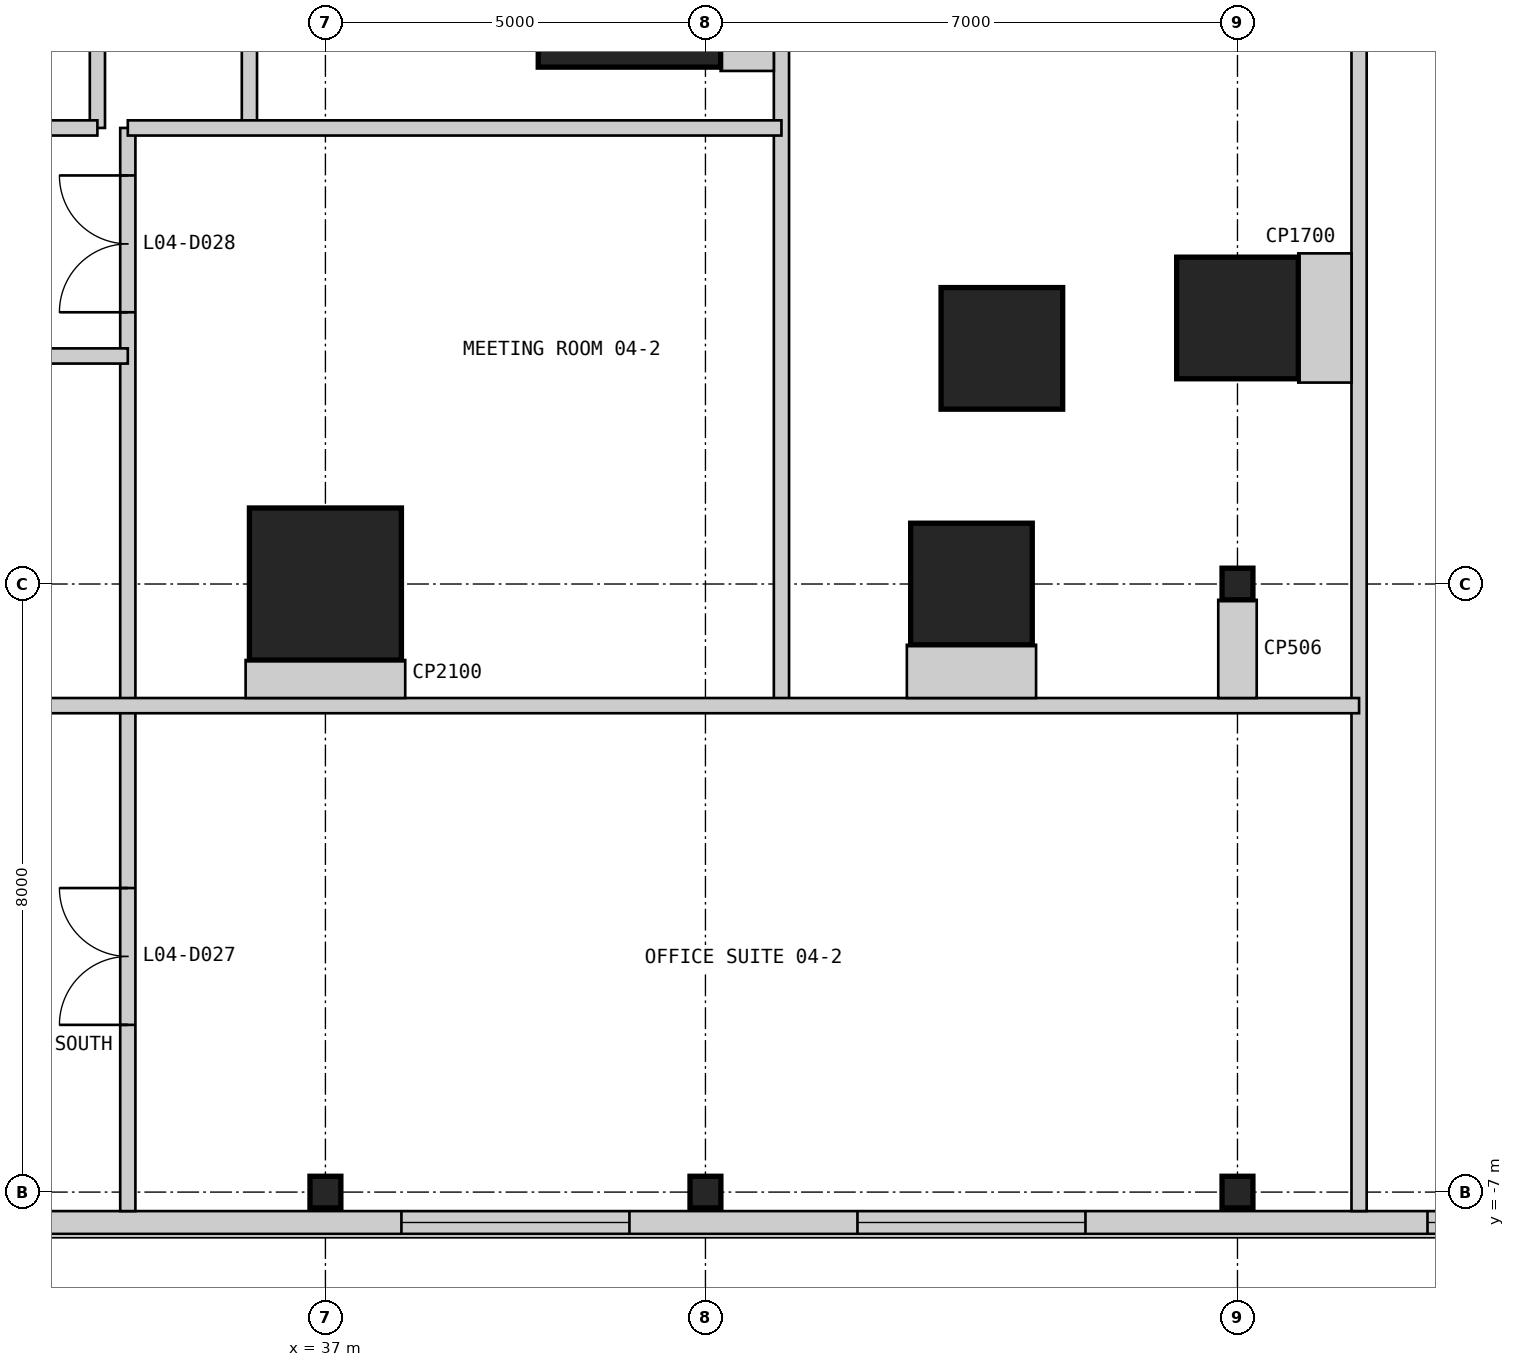
"""IFC4 building model, lengths in metres.
Left out: names, types, materials, properties, quantities, classifications, styles, units other than length and angle.
Written with IfcOpenShell. Run it as: python <this file> out.ifc"""

import sys

from ifc_helpers import new_model, si_unit, direction, frame, frame_2d, origin, origin_2d, place, context, subcontext, project, spatial, rectangle, i_section, extrude, element, fill, save


model = new_model("IFC4")
c1 = context("Model", 3, precision=1e-05, world=origin(), true_north=direction((0.0, 1.0)))
c2 = subcontext(c1, "Body", "Model", "MODEL_VIEW")
j1 = project(units=[si_unit("LENGTHUNIT", "METRE"), si_unit("PLANEANGLEUNIT", "RADIAN")], contexts=[c1])
p1 = place(None, origin())
s1 = spatial("IfcSite", under=j1, at=p1, CompositionType="ELEMENT")
p2 = place(p1, origin())
s2 = spatial("IfcBuilding", under=s1, at=p2, CompositionType="ELEMENT")
p3 = place(p2, frame((0.0, 0.0, 21.4)))
s3 = spatial("IfcBuildingStorey", under=s2, at=p3, CompositionType="ELEMENT", Elevation=21.4)
p4 = place(p3, frame((41.0, 9.0, 0.0), z_axis=(0.0, 0.0, 1.0), x_axis=(1.0, 0.0, 0.0)))
e1 = element("IfcColumn", 1, at=p4, inside=s3, PredefinedType="COLUMN", context=c2, shape_type="SweptSolid", body=[
    extrude(rectangle(XDim=2.4, YDim=2.4, at=origin_2d()), origin(), (0.0, 0.0, 1.0), 4.8),
])
p5 = place(p3, frame((37.0, 1.0, 0.0), z_axis=(0.0, 0.0, 1.0), x_axis=(1.0, 0.0, 0.0)))
e2 = element("IfcColumn", 2, at=p5, inside=s3, PredefinedType="COLUMN", context=c2, shape_type="SweptSolid", body=[
    extrude(rectangle(XDim=2.0, YDim=2.0, at=origin_2d()), origin(), (0.0, 0.0, 1.0), 4.8),
])
for number, where, z_axis, x_axis in (
    (3, (45.5, 1.0, 0.0), (0.0, 0.0, 1.0), (1.0, 0.0, 0.0)),
    (4, (45.9, 4.1, 0.0), (0.0, 0.0, 1.0), (1.0, 0.0, 0.0)),
    (5, (49.0, 4.5, 0.0), (0.0, 0.0, 1.0), (1.0, 0.0, 0.0)),
):
    element("IfcColumn", number, at=place(p3, frame(where, z_axis=z_axis, x_axis=x_axis)), inside=s3, PredefinedType="COLUMN", context=c2, shape_type="SweptSolid", body=[
        extrude(rectangle(XDim=1.6, YDim=1.6, at=origin_2d()), origin(), (0.0, 0.0, 1.0), 4.8),
    ])
for number, where, z_axis, x_axis in (
    (6, (37.0, -7.0, 0.0), (0.0, 0.0, 1.0), (1.0, 0.0, 0.0)),
    (7, (42.0, -7.0, 0.0), (0.0, 0.0, 1.0), (1.0, 0.0, 0.0)),
    (8, (49.0, -7.0, 0.0), (0.0, 0.0, 1.0), (1.0, 0.0, 0.0)),
    (9, (49.0, 1.0, 0.0), (0.0, 0.0, 1.0), (1.0, 0.0, 0.0)),
):
    element("IfcColumn", number, at=place(p3, frame(where, z_axis=z_axis, x_axis=x_axis)), inside=s3, PredefinedType="COLUMN", context=c2, shape_type="SweptSolid", body=[
        extrude(i_section(OverallWidth=0.406, OverallDepth=0.417, WebThickness=0.03, FlangeThickness=0.048, at=origin_2d()), origin(), (0.0, 0.0, 1.0), 4.8),
    ])
p6 = place(p3, frame((-7.55, -7.4, 0.0), z_axis=(0.0, 0.0, 1.0), x_axis=(1.0, 0.0, 0.0)))
e10 = element("IfcWall", 10, at=p6, inside=s3, PredefinedType="SOLIDWALL", context=c2, shape_type="SweptSolid", body=[
    extrude(rectangle(XDim=65.1, YDim=0.3, at=frame_2d((32.55, 0.0))), origin(), (0.0, 0.0, 1.0), 4.5),
])
p7 = place(p6, frame((3.05, 0.0, 0.9)))
e11 = element("IfcOpeningElement", 11, at=p7, cuts=e10, PredefinedType="OPENING", context=c2, shape_type="SweptSolid", body=[
    extrude(rectangle(XDim=3.0, YDim=2.4, at=frame_2d((1.5, 1.2))), frame((0.0, 0.16, 0.0), z_axis=(0.0, -1.0, 0.0), x_axis=(1.0, 0.0, 0.0)), (0.0, 0.0, 1.0), 0.32),
])
p8 = place(p6, frame((11.05, 0.0, 0.9)))
e12 = element("IfcOpeningElement", 12, at=p8, cuts=e10, PredefinedType="OPENING", context=c2, shape_type="SweptSolid", body=[
    extrude(rectangle(XDim=3.0, YDim=2.4, at=frame_2d((1.5, 1.2))), frame((0.0, 0.16, 0.0), z_axis=(0.0, -1.0, 0.0), x_axis=(1.0, 0.0, 0.0)), (0.0, 0.0, 1.0), 0.32),
])
p9 = place(p6, frame((25.05, 0.0, 0.9)))
e13 = element("IfcOpeningElement", 13, at=p9, cuts=e10, PredefinedType="OPENING", context=c2, shape_type="SweptSolid", body=[
    extrude(rectangle(XDim=3.0, YDim=2.4, at=frame_2d((1.5, 1.2))), frame((0.0, 0.16, 0.0), z_axis=(0.0, -1.0, 0.0), x_axis=(1.0, 0.0, 0.0)), (0.0, 0.0, 1.0), 0.32),
])
p10 = place(p6, frame((37.05, 0.0, 0.9)))
e14 = element("IfcOpeningElement", 14, at=p10, cuts=e10, PredefinedType="OPENING", context=c2, shape_type="SweptSolid", body=[
    extrude(rectangle(XDim=3.0, YDim=2.4, at=frame_2d((1.5, 1.2))), frame((0.0, 0.16, 0.0), z_axis=(0.0, -1.0, 0.0), x_axis=(1.0, 0.0, 0.0)), (0.0, 0.0, 1.0), 0.32),
])
p11 = place(p6, frame((45.55, 0.0, 0.9)))
e15 = element("IfcOpeningElement", 15, at=p11, cuts=e10, PredefinedType="OPENING", context=c2, shape_type="SweptSolid", body=[
    extrude(rectangle(XDim=3.0, YDim=2.4, at=frame_2d((1.5, 1.2))), frame((0.0, 0.16, 0.0), z_axis=(0.0, -1.0, 0.0), x_axis=(1.0, 0.0, 0.0)), (0.0, 0.0, 1.0), 0.32),
])
p12 = place(p6, frame((51.55, 0.0, 0.9)))
e16 = element("IfcOpeningElement", 16, at=p12, cuts=e10, PredefinedType="OPENING", context=c2, shape_type="SweptSolid", body=[
    extrude(rectangle(XDim=3.0, YDim=2.4, at=frame_2d((1.5, 1.2))), frame((0.0, 0.16, 0.0), z_axis=(0.0, -1.0, 0.0), x_axis=(1.0, 0.0, 0.0)), (0.0, 0.0, 1.0), 0.32),
])
p13 = place(p6, frame((59.05, 0.0, 0.9)))
e17 = element("IfcOpeningElement", 17, at=p13, cuts=e10, PredefinedType="OPENING", context=c2, shape_type="SweptSolid", body=[
    extrude(rectangle(XDim=3.0, YDim=2.4, at=frame_2d((1.5, 1.2))), frame((0.0, 0.16, 0.0), z_axis=(0.0, -1.0, 0.0), x_axis=(1.0, 0.0, 0.0)), (0.0, 0.0, 1.0), 0.32),
])
p14 = place(p3, frame((34.0, 7.0, 0.0), z_axis=(0.0, 0.0, 1.0), x_axis=(0.0, 1.0, 0.0)))
e18 = element("IfcWall", 18, at=p14, inside=s3, PredefinedType="PARTITIONING", context=c2, shape_type="SweptSolid", body=[
    extrude(rectangle(XDim=3.6, YDim=0.2, at=frame_2d((1.8, 0.0))), origin(), (0.0, 0.0, 1.0), 3.843),
])
p15 = place(p3, frame((34.4, -7.25, 0.0), z_axis=(0.0, 0.0, 1.0), x_axis=(0.0, 1.0, 0.0)))
e19 = element("IfcWall", 19, at=p15, inside=s3, PredefinedType="PARTITIONING", context=c2, shape_type="SweptSolid", body=[
    extrude(rectangle(XDim=14.25, YDim=0.2, at=frame_2d((7.125, 0.0))), origin(), (0.0, 0.0, 1.0), 4.5),
])
p16 = place(p15, frame((2.45, 0.0, 0.0)))
e20 = element("IfcOpeningElement", 20, at=p16, cuts=e19, PredefinedType="OPENING", context=c2, shape_type="SweptSolid", body=[
    extrude(rectangle(XDim=1.8, YDim=2.4, at=frame_2d((0.9, 1.2))), frame((0.0, 0.11, 0.0), z_axis=(0.0, -1.0, 0.0), x_axis=(1.0, 0.0, 0.0)), (0.0, 0.0, 1.0), 0.22),
])
p17 = place(p15, frame((11.825, 0.0, 0.0)))
e21 = element("IfcOpeningElement", 21, at=p17, cuts=e19, PredefinedType="OPENING", context=c2, shape_type="SweptSolid", body=[
    extrude(rectangle(XDim=1.8, YDim=2.4, at=frame_2d((0.9, 1.2))), frame((0.0, 0.11, 0.0), z_axis=(0.0, -1.0, 0.0), x_axis=(1.0, 0.0, 0.0)), (0.0, 0.0, 1.0), 0.22),
])
p18 = place(p3, frame((36.0, 7.0, 0.0), z_axis=(0.0, 0.0, 1.0), x_axis=(0.0, 1.0, 0.0)))
e22 = element("IfcWall", 22, at=p18, inside=s3, PredefinedType="PARTITIONING", context=c2, shape_type="SweptSolid", body=[
    extrude(rectangle(XDim=6.0, YDim=0.2, at=frame_2d((3.0, 0.0))), origin(), (0.0, 0.0, 1.0), 4.5),
])
p19 = place(p18, frame((3.3, 0.0, 0.0)))
e23 = element("IfcOpeningElement", 23, at=p19, cuts=e22, PredefinedType="OPENING", context=c2, shape_type="SweptSolid", body=[
    extrude(rectangle(XDim=0.9, YDim=2.2, at=frame_2d((0.45, 1.1))), frame((0.0, 0.11, 0.0), z_axis=(0.0, -1.0, 0.0), x_axis=(1.0, 0.0, 0.0)), (0.0, 0.0, 1.0), 0.22),
])
p20 = place(p3, frame((43.0, -0.6, 0.0), z_axis=(0.0, 0.0, 1.0), x_axis=(0.0, 1.0, 0.0)))
e24 = element("IfcWall", 24, at=p20, inside=s3, PredefinedType="PARTITIONING", context=c2, shape_type="SweptSolid", body=[
    extrude(rectangle(XDim=28.6, YDim=0.2, at=frame_2d((14.3, 0.0))), origin(), (0.0, 0.0, 1.0), 3.843),
])
p21 = place(p3, frame((50.6, -7.25, 0.0), z_axis=(0.0, 0.0, 1.0), x_axis=(0.0, 1.0, 0.0)))
e25 = element("IfcWall", 25, at=p21, inside=s3, PredefinedType="PARTITIONING", context=c2, shape_type="SweptSolid", body=[
    extrude(rectangle(XDim=22.85, YDim=0.2, at=frame_2d((11.425, 0.0))), origin(), (0.0, 0.0, 1.0), 4.5),
])
p22 = place(p3, frame((26.4, -0.6, 0.0), z_axis=(0.0, 0.0, 1.0), x_axis=(1.0, 0.0, 0.0)))
e26 = element("IfcWall", 26, at=p22, inside=s3, PredefinedType="PARTITIONING", context=c2, shape_type="SweptSolid", body=[
    extrude(rectangle(XDim=24.2, YDim=0.2, at=frame_2d((12.1, 0.0))), origin(), (0.0, 0.0, 1.0), 4.5),
])
p23 = place(p3, frame((26.4, 4.0, 0.0), z_axis=(0.0, 0.0, 1.0), x_axis=(1.0, 0.0, 0.0)))
e27 = element("IfcWall", 27, at=p23, inside=s3, PredefinedType="PARTITIONING", context=c2, shape_type="SweptSolid", body=[
    extrude(rectangle(XDim=8.0, YDim=0.2, at=frame_2d((4.0, 0.0))), origin(), (0.0, 0.0, 1.0), 4.5),
])
p24 = place(p23, frame((3.55, 0.0, 0.0)))
e28 = element("IfcOpeningElement", 28, at=p24, cuts=e27, PredefinedType="OPENING", context=c2, shape_type="SweptSolid", body=[
    extrude(rectangle(XDim=0.9, YDim=2.2, at=frame_2d((0.45, 1.1))), frame((0.0, 0.11, 0.0), z_axis=(0.0, -1.0, 0.0), x_axis=(1.0, 0.0, 0.0)), (0.0, 0.0, 1.0), 0.22),
])
p25 = place(p3, frame((25.6, 7.0, 0.0), z_axis=(0.0, 0.0, 1.0), x_axis=(1.0, 0.0, 0.0)))
e29 = element("IfcWall", 29, at=p25, inside=s3, PredefinedType="PARTITIONING", context=c2, shape_type="SweptSolid", body=[
    extrude(rectangle(XDim=8.4, YDim=0.2, at=frame_2d((4.2, 0.0))), origin(), (0.0, 0.0, 1.0), 4.5),
])
p26 = place(p3, frame((34.4, 7.0, 0.0), z_axis=(0.0, 0.0, 1.0), x_axis=(1.0, 0.0, 0.0)))
e30 = element("IfcWall", 30, at=p26, inside=s3, PredefinedType="PARTITIONING", context=c2, shape_type="SweptSolid", body=[
    extrude(rectangle(XDim=8.6, YDim=0.2, at=frame_2d((4.3, 0.0))), origin(), (0.0, 0.0, 1.0), 4.5),
])
p27 = place(p3, frame((37.0, -0.5, 0.0), z_axis=(0.0, 0.0, 1.0), x_axis=(0.0, 1.0, 0.0)))
e31 = element("IfcWall", 31, at=p27, inside=s3, PredefinedType="PARTITIONING", context=c2, shape_type="SweptSolid", body=[
    extrude(rectangle(XDim=0.5, YDim=2.1, at=frame_2d((0.25, 0.0))), origin(), (0.0, 0.0, 1.0), 4.5),
])
for number, where, z_axis, x_axis in (
    (32, (45.5, -0.5, 0.0), (0.0, 0.0, 1.0), (0.0, 1.0, 0.0)),
    (33, (50.5, 4.5, 0.0), (0.0, 0.0, 1.0), (-1.0, 0.0, 0.0)),
):
    element("IfcWall", number, at=place(p3, frame(where, z_axis=z_axis, x_axis=x_axis)), inside=s3, PredefinedType="PARTITIONING", context=c2, shape_type="SweptSolid", body=[
        extrude(rectangle(XDim=0.7, YDim=1.7, at=frame_2d((0.35, 0.0))), origin(), (0.0, 0.0, 1.0), 4.5),
    ])
p28 = place(p3, frame((49.0, -0.5, 0.0), z_axis=(0.0, 0.0, 1.0), x_axis=(0.0, 1.0, 0.0)))
e34 = element("IfcWall", 34, at=p28, inside=s3, PredefinedType="PARTITIONING", context=c2, shape_type="SweptSolid", body=[
    extrude(rectangle(XDim=1.292, YDim=0.506, at=frame_2d((0.646, 0.0))), origin(), (0.0, 0.0, 1.0), 3.754),
])
p29 = place(p3, frame((42.9, 9.0, 0.0), z_axis=(0.0, 0.0, 1.0), x_axis=(-1.0, 0.0, 0.0)))
e35 = element("IfcWall", 35, at=p29, inside=s3, PredefinedType="PARTITIONING", context=c2, shape_type="SweptSolid", body=[
    extrude(rectangle(XDim=0.7, YDim=2.5, at=frame_2d((0.35, 0.0))), origin(), (0.0, 0.0, 1.0), 4.5),
])
p30 = place(p11, origin())
e36 = element("IfcWindow", 36, at=p30, inside=s3, PartitioningType="SINGLE_PANEL", PredefinedType="WINDOW", context=c2, shape_type="SweptSolid", body=[
    extrude(rectangle(XDim=3.0, YDim=2.4, at=frame_2d((1.5, 1.2))), frame((0.0, 0.03, 0.0), z_axis=(0.0, -1.0, 0.0), x_axis=(1.0, 0.0, 0.0)), (0.0, 0.0, 1.0), 0.06),
])
fill(e15, e36)
p31 = place(p12, origin())
e37 = element("IfcWindow", 37, at=p31, inside=s3, PartitioningType="SINGLE_PANEL", PredefinedType="WINDOW", context=c2, shape_type="SweptSolid", body=[
    extrude(rectangle(XDim=3.0, YDim=2.4, at=frame_2d((1.5, 1.2))), frame((0.0, 0.03, 0.0), z_axis=(0.0, -1.0, 0.0), x_axis=(1.0, 0.0, 0.0)), (0.0, 0.0, 1.0), 0.06),
])
fill(e16, e37)
p32 = place(p13, origin())
e38 = element("IfcWindow", 38, at=p32, inside=s3, PartitioningType="SINGLE_PANEL", PredefinedType="WINDOW", context=c2, shape_type="SweptSolid", body=[
    extrude(rectangle(XDim=3.0, YDim=2.4, at=frame_2d((1.5, 1.2))), frame((0.0, 0.03, 0.0), z_axis=(0.0, -1.0, 0.0), x_axis=(1.0, 0.0, 0.0)), (0.0, 0.0, 1.0), 0.06),
])
fill(e17, e38)
p33 = place(p16, origin())
e39 = element("IfcDoor", 39, at=p33, inside=s3, OperationType="DOUBLE_DOOR_SINGLE_SWING", PredefinedType="DOOR", context=c2, shape_type="SweptSolid", body=[
    extrude(rectangle(XDim=1.8, YDim=2.4, at=frame_2d((0.9, 1.2))), frame((0.0, 0.025, 0.0), z_axis=(0.0, -1.0, 0.0), x_axis=(1.0, 0.0, 0.0)), (0.0, 0.0, 1.0), 0.05),
])
fill(e20, e39)
p34 = place(p17, origin())
e40 = element("IfcDoor", 40, at=p34, inside=s3, OperationType="DOUBLE_DOOR_SINGLE_SWING", PredefinedType="DOOR", context=c2, shape_type="SweptSolid", body=[
    extrude(rectangle(XDim=1.8, YDim=2.4, at=frame_2d((0.9, 1.2))), frame((0.0, 0.025, 0.0), z_axis=(0.0, -1.0, 0.0), x_axis=(1.0, 0.0, 0.0)), (0.0, 0.0, 1.0), 0.05),
])
fill(e21, e40)
save(model, sys.argv[1])
